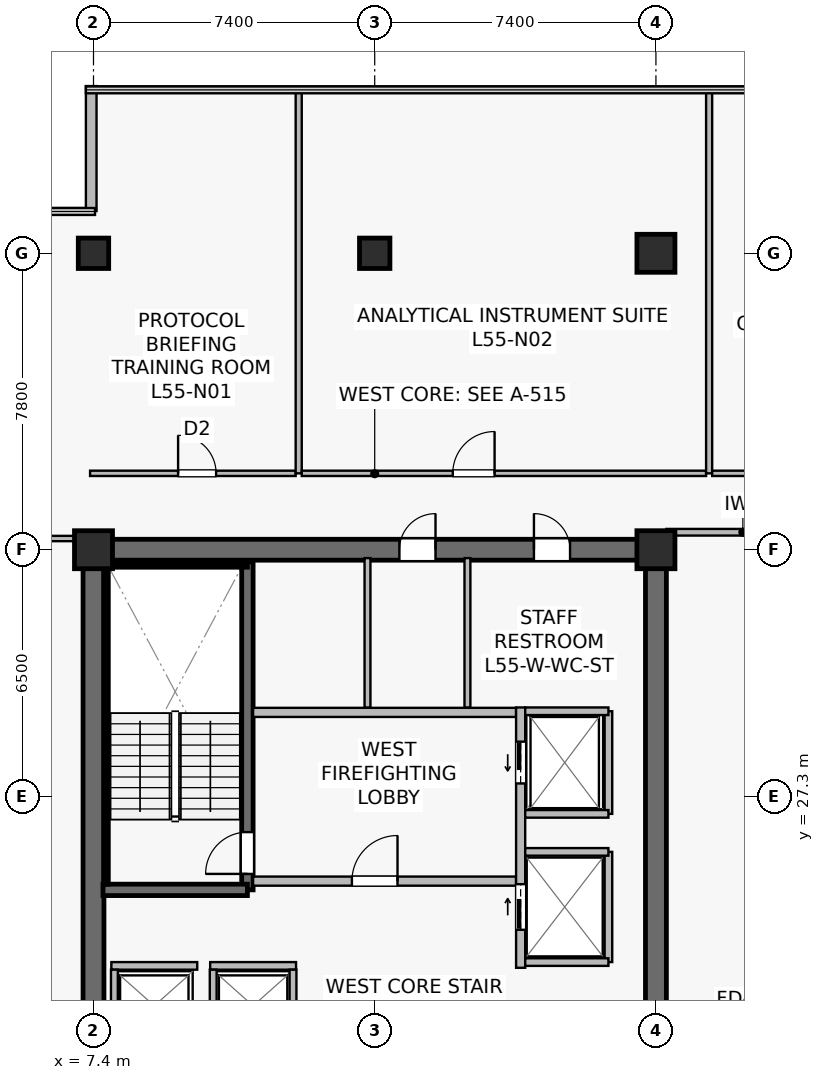
"""IFC4 building model, lengths in metres.
Left out: names, types, materials, properties, quantities, classifications, styles, units other than length and angle.
Written with IfcOpenShell. Run it as: python <this file> out.ifc"""

import sys

from ifc_helpers import new_model, si_unit, direction, frame, frame_2d, origin, origin_2d, place, context, subcontext, project, spatial, rectangle, extrude, source, transform, mapped, element, fill, save


model = new_model("IFC4")
c1 = context("Model", 3, precision=1e-05, world=origin(), true_north=direction((0.0, 1.0)))
c2 = subcontext(c1, "Body", "Model", "MODEL_VIEW")
j1 = project(units=[si_unit("LENGTHUNIT", "METRE"), si_unit("PLANEANGLEUNIT", "RADIAN")], contexts=[c1])
p1 = place(None, origin())
s1 = spatial("IfcSite", under=j1, at=p1, CompositionType="ELEMENT")
p2 = place(p1, origin())
s2 = spatial("IfcBuilding", under=s1, at=p2, CompositionType="ELEMENT")
p3 = place(p2, frame((0.0, 0.0, 230.1)))
s3 = spatial("IfcBuildingStorey", under=s2, at=p3, CompositionType="ELEMENT", Elevation=230.1)
p4 = place(p3, frame((7.125, 33.8, 0.0), z_axis=(0.0, 0.0, 1.0), x_axis=(1.0, 0.0, 0.0)))
e1 = element("IfcWall", 1, at=p4, inside=s3, PredefinedType="SHEAR", context=c2, shape_type="SweptSolid", body=[
    extrude(rectangle(XDim=15.35, YDim=0.55, at=frame_2d((7.675, 0.0))), origin(), (0.0, 0.0, 1.0), 3.8),
])
p5 = place(p4, frame((8.325, 0.0, 0.0)))
e2 = element("IfcOpeningElement", 2, at=p5, cuts=e1, PredefinedType="OPENING", context=c2, shape_type="SweptSolid", body=[
    extrude(rectangle(XDim=0.95, YDim=2.15, at=frame_2d((0.475, 1.075))), frame((0.0, 0.285, 0.0), z_axis=(0.0, -1.0, 0.0), x_axis=(1.0, 0.0, 0.0)), (0.0, 0.0, 1.0), 0.57),
])
p6 = place(p4, frame((11.865, 0.0, 0.0)))
e3 = element("IfcOpeningElement", 3, at=p6, cuts=e1, PredefinedType="OPENING", context=c2, shape_type="SweptSolid", body=[
    extrude(rectangle(XDim=0.95, YDim=2.15, at=frame_2d((0.475, 1.075))), frame((0.0, 0.285, 0.0), z_axis=(0.0, -1.0, 0.0), x_axis=(1.0, 0.0, 0.0)), (0.0, 0.0, 1.0), 0.57),
])
p7 = place(p3, frame((7.4, 15.075, 0.0), z_axis=(0.0, 0.0, 1.0), x_axis=(0.0, 1.0, 0.0)))
e4 = element("IfcWall", 4, at=p7, inside=s3, PredefinedType="SHEAR", context=c2, shape_type="SweptSolid", body=[
    extrude(rectangle(XDim=18.45, YDim=0.55, at=frame_2d((9.225, 0.0))), origin(), (0.0, 0.0, 1.0), 3.8),
])
p8 = place(p3, frame((22.2, 15.075, 0.0), z_axis=(0.0, 0.0, 1.0), x_axis=(0.0, 1.0, 0.0)))
e5 = element("IfcWall", 5, at=p8, inside=s3, PredefinedType="SHEAR", context=c2, shape_type="SweptSolid", body=[
    extrude(rectangle(XDim=18.45, YDim=0.55, at=frame_2d((9.225, 0.0))), origin(), (0.0, 0.0, 1.0), 3.8),
])
p9 = place(p8, frame((3.475, 0.0, 0.0)))
e6 = element("IfcOpeningElement", 6, at=p9, cuts=e5, PredefinedType="OPENING", context=c2, shape_type="SweptSolid", body=[
    extrude(rectangle(XDim=1.42, YDim=2.2, at=frame_2d((0.71, 1.1))), frame((0.0, 0.285, 0.0), z_axis=(0.0, -1.0, 0.0), x_axis=(1.0, 0.0, 0.0)), (0.0, 0.0, 1.0), 0.57),
])
p10 = place(p3, frame((11.45, 24.85, 0.0), z_axis=(0.0, 0.0, 1.0), x_axis=(0.0, 1.0, 0.0)))
e7 = element("IfcWall", 7, at=p10, inside=s3, PredefinedType="SHEAR", context=c2, shape_type="SweptSolid", body=[
    extrude(rectangle(XDim=8.63, YDim=0.3, at=frame_2d((4.315, 0.0))), origin(), (0.0, 0.0, 1.0), 3.8),
])
p11 = place(p10, frame((0.42, 0.0, 0.0)))
e8 = element("IfcOpeningElement", 8, at=p11, cuts=e7, PredefinedType="OPENING", context=c2, shape_type="SweptSolid", body=[
    extrude(rectangle(XDim=1.1, YDim=2.15, at=frame_2d((0.55, 1.075))), frame((0.0, 0.16, 0.0), z_axis=(0.0, -1.0, 0.0), x_axis=(1.0, 0.0, 0.0)), (0.0, 0.0, 1.0), 0.32),
])
p12 = place(p3, frame((7.65, 24.85, 0.0), z_axis=(0.0, 0.0, 1.0), x_axis=(1.0, 0.0, 0.0)))
e9 = element("IfcWall", 9, at=p12, inside=s3, PredefinedType="SHEAR", context=c2, shape_type="SweptSolid", body=[
    extrude(rectangle(XDim=3.8, YDim=0.3, at=frame_2d((1.9, 0.0))), origin(), (0.0, 0.0, 1.0), 3.8),
])
p13 = place(p3, frame((7.73, 33.4, 0.0), z_axis=(0.0, 0.0, 1.0), x_axis=(1.0, 0.0, 0.0)))
e10 = element("IfcWall", 10, at=p13, inside=s3, PredefinedType="SOLIDWALL", context=c2, shape_type="SweptSolid", body=[
    extrude(rectangle(XDim=3.72, YDim=0.12, at=frame_2d((1.86, 0.0))), origin(), (0.0, 0.0, 1.0), 3.8),
])
p14 = place(p3, frame((7.73, 25.0, 0.0), z_axis=(0.0, 0.0, 1.0), x_axis=(0.0, 1.0, 0.0)))
e11 = element("IfcWall", 11, at=p14, inside=s3, PredefinedType="SOLIDWALL", context=c2, shape_type="SweptSolid", body=[
    extrude(rectangle(XDim=8.32, YDim=0.12, at=frame_2d((4.16, 0.0))), origin(), (0.0, 0.0, 1.0), 3.8),
])
m1 = source(origin(), c2, "Body", "SweptSolid", [
    extrude(rectangle(XDim=1.0, YDim=1.0, at=origin_2d()), origin(), (0.0, 0.0, 1.0), 4.1),
])
for number, where, z_axis, x_axis in (
    (12, (7.4, 33.8, 0.0), (0.0, 0.0, 1.0), (1.0, 0.0, 0.0)),
    (13, (22.2, 33.8, 0.0), (0.0, 0.0, 1.0), (1.0, 0.0, 0.0)),
):
    element("IfcColumn", number, at=place(p3, frame(where, z_axis=z_axis, x_axis=x_axis)), inside=s3, PredefinedType="COLUMN", context=c2, shape_type="MappedRepresentation", body=[
        mapped(m1, transform((0.0, 0.0, 0.0), scale=1.0)),
    ])
m2 = source(origin(), c2, "Body", "SweptSolid", [
    extrude(rectangle(XDim=0.8, YDim=0.8, at=origin_2d()), origin(), (0.0, 0.0, 1.0), 4.1),
])
p15 = place(p3, frame((14.8, 41.6, 0.0), z_axis=(0.0, 0.0, 1.0), x_axis=(1.0, 0.0, 0.0)))
e14 = element("IfcColumn", 14, at=p15, inside=s3, PredefinedType="COLUMN", context=c2, shape_type="MappedRepresentation", body=[
    mapped(m2, transform((0.0, 0.0, 0.0), scale=1.0)),
])
p16 = place(p3, frame((22.2, 41.6, 0.0), z_axis=(0.0, 0.0, 1.0), x_axis=(1.0, 0.0, 0.0)))
e15 = element("IfcColumn", 15, at=p16, inside=s3, PredefinedType="COLUMN", context=c2, shape_type="MappedRepresentation", body=[
    mapped(m1, transform((0.0, 0.0, 0.0), scale=1.0)),
])
p17 = place(p3, frame((7.4, 41.6, 0.0), z_axis=(0.0, 0.0, 1.0), x_axis=(1.0, 0.0, 0.0)))
e16 = element("IfcColumn", 16, at=p17, inside=s3, PredefinedType="COLUMN", context=c2, shape_type="MappedRepresentation", body=[
    mapped(m2, transform((0.0, 0.0, 0.0), scale=1.0)),
])
p18 = place(p3, frame((7.34, 46.0, 0.0), z_axis=(0.0, 0.0, 1.0), x_axis=(0.0, -1.0, 0.0)))
e17 = element("IfcWall", 17, at=p18, inside=s3, PredefinedType="STANDARD", context=c2, shape_type="SweptSolid", body=[
    extrude(rectangle(XDim=3.288, YDim=0.28, at=frame_2d((1.644, 0.0))), origin(), (0.0, 0.0, 1.0), 3.8),
])
p19 = place(p3, frame((11.6, 25.08, 0.0), z_axis=(0.0, 0.0, 1.0), x_axis=(1.0, 0.0, 0.0)))
e18 = element("IfcWall", 18, at=p19, inside=s3, PredefinedType="SOLIDWALL", context=c2, shape_type="SweptSolid", body=[
    extrude(rectangle(XDim=6.92, YDim=0.24, at=frame_2d((3.46, 0.0))), origin(), (0.0, 0.0, 1.0), 3.197),
])
p20 = place(p19, frame((2.6, 0.0, 0.0)))
e19 = element("IfcOpeningElement", 19, at=p20, cuts=e18, PredefinedType="OPENING", context=c2, shape_type="SweptSolid", body=[
    extrude(rectangle(XDim=1.2, YDim=2.16, at=frame_2d((0.6, 1.08))), frame((0.0, 0.13, 0.0), z_axis=(0.0, -1.0, 0.0), x_axis=(1.0, 0.0, 0.0)), (0.0, 0.0, 1.0), 0.26),
])
p21 = place(p3, frame((11.6, 29.52, 0.0), z_axis=(0.0, 0.0, 1.0), x_axis=(1.0, 0.0, 0.0)))
e20 = element("IfcWall", 20, at=p21, inside=s3, PredefinedType="SOLIDWALL", context=c2, shape_type="SweptSolid", body=[
    extrude(rectangle(XDim=6.92, YDim=0.24, at=frame_2d((3.46, 0.0))), origin(), (0.0, 0.0, 1.0), 3.197),
])
p22 = place(p3, frame((18.64, 22.8, 0.0), z_axis=(0.0, 0.0, 1.0), x_axis=(0.0, 1.0, 0.0)))
e21 = element("IfcWall", 21, at=p22, inside=s3, PredefinedType="SOLIDWALL", context=c2, shape_type="SweptSolid", body=[
    extrude(rectangle(XDim=6.85, YDim=0.24, at=frame_2d((3.425, 0.0))), origin(), (0.0, 0.0, 1.0), 2.935),
])
p23 = place(p22, frame((4.85, 0.0, 0.0)))
e22 = element("IfcOpeningElement", 22, at=p23, cuts=e21, PredefinedType="OPENING", context=c2, shape_type="SweptSolid", body=[
    extrude(rectangle(XDim=1.1, YDim=2.22, at=frame_2d((0.55, 1.11))), frame((0.0, 0.13, 0.0), z_axis=(0.0, -1.0, 0.0), x_axis=(1.0, 0.0, 0.0)), (0.0, 0.0, 1.0), 0.26),
])
p24 = place(p22, frame((1.0, 0.0, 0.0)))
e23 = element("IfcOpeningElement", 23, at=p24, cuts=e21, PredefinedType="OPENING", context=c2, shape_type="SweptSolid", body=[
    extrude(rectangle(XDim=1.2, YDim=2.22, at=frame_2d((0.6, 1.11))), frame((0.0, 0.13, 0.0), z_axis=(0.0, -1.0, 0.0), x_axis=(1.0, 0.0, 0.0)), (0.0, 0.0, 1.0), 0.26),
])
p25 = place(p3, frame((7.87, 22.85, 0.0), z_axis=(0.0, 0.0, 1.0), x_axis=(1.0, 0.0, 0.0)))
e24 = element("IfcWall", 24, at=p25, inside=s3, PredefinedType="SOLIDWALL", context=c2, shape_type="SweptSolid", body=[
    extrude(rectangle(XDim=2.26, YDim=0.2, at=frame_2d((1.13, 0.0))), origin(), (0.0, 0.0, 1.0), 3.8),
])
p26 = place(p3, frame((7.95, 20.85, 0.0), z_axis=(0.0, 0.0, 1.0), x_axis=(0.0, 1.0, 0.0)))
e25 = element("IfcWall", 25, at=p26, inside=s3, PredefinedType="SOLIDWALL", context=c2, shape_type="SweptSolid", body=[
    extrude(rectangle(XDim=1.9, YDim=0.18, at=frame_2d((0.95, 0.0))), origin(), (0.0, 0.0, 1.0), 3.8),
])
p27 = place(p3, frame((10.47, 22.85, 0.0), z_axis=(0.0, 0.0, 1.0), x_axis=(1.0, 0.0, 0.0)))
e26 = element("IfcWall", 26, at=p27, inside=s3, PredefinedType="SOLIDWALL", context=c2, shape_type="SweptSolid", body=[
    extrude(rectangle(XDim=2.26, YDim=0.2, at=frame_2d((1.13, 0.0))), origin(), (0.0, 0.0, 1.0), 3.8),
])
for number, where, z_axis, x_axis in (
    (27, (10.55, 20.85, 0.0), (0.0, 0.0, 1.0), (0.0, 1.0, 0.0)),
    (28, (12.65, 20.85, 0.0), (0.0, 0.0, 1.0), (0.0, 1.0, 0.0)),
):
    element("IfcWall", number, at=place(p3, frame(where, z_axis=z_axis, x_axis=x_axis)), inside=s3, PredefinedType="SOLIDWALL", context=c2, shape_type="SweptSolid", body=[
        extrude(rectangle(XDim=1.9, YDim=0.18, at=frame_2d((0.95, 0.0))), origin(), (0.0, 0.0, 1.0), 3.8),
    ])
p28 = place(p3, frame((20.95, 26.85, 0.0), z_axis=(0.0, 0.0, 1.0), x_axis=(0.0, 1.0, 0.0)))
e29 = element("IfcWall", 29, at=p28, inside=s3, PredefinedType="SOLIDWALL", context=c2, shape_type="SweptSolid", body=[
    extrude(rectangle(XDim=2.7, YDim=0.2, at=frame_2d((1.35, 0.0))), origin(), (0.0, 0.0, 1.0), 3.8),
])
p29 = place(p3, frame((18.76, 29.55, 0.0), z_axis=(0.0, 0.0, 1.0), x_axis=(1.0, 0.0, 0.0)))
e30 = element("IfcWall", 30, at=p29, inside=s3, PredefinedType="SOLIDWALL", context=c2, shape_type="SweptSolid", body=[
    extrude(rectangle(XDim=2.19, YDim=0.2, at=frame_2d((1.095, 0.0))), origin(), (0.0, 0.0, 1.0), 3.8),
])
p30 = place(p3, frame((18.76, 26.85, 0.0), z_axis=(0.0, 0.0, 1.0), x_axis=(1.0, 0.0, 0.0)))
e31 = element("IfcWall", 31, at=p30, inside=s3, PredefinedType="SOLIDWALL", context=c2, shape_type="SweptSolid", body=[
    extrude(rectangle(XDim=2.19, YDim=0.2, at=frame_2d((1.095, 0.0))), origin(), (0.0, 0.0, 1.0), 3.197),
])
p31 = place(p3, frame((20.95, 22.95, 0.0), z_axis=(0.0, 0.0, 1.0), x_axis=(0.0, 1.0, 0.0)))
e32 = element("IfcWall", 32, at=p31, inside=s3, PredefinedType="SOLIDWALL", context=c2, shape_type="SweptSolid", body=[
    extrude(rectangle(XDim=2.9, YDim=0.2, at=frame_2d((1.45, 0.0))), origin(), (0.0, 0.0, 1.0), 2.935),
])
for number, where, z_axis, x_axis in (
    (33, (18.76, 25.85, 0.0), (0.0, 0.0, 1.0), (1.0, 0.0, 0.0)),
    (34, (18.76, 22.95, 0.0), (0.0, 0.0, 1.0), (1.0, 0.0, 0.0)),
):
    element("IfcWall", number, at=place(p3, frame(where, z_axis=z_axis, x_axis=x_axis)), inside=s3, PredefinedType="SOLIDWALL", context=c2, shape_type="SweptSolid", body=[
        extrude(rectangle(XDim=2.19, YDim=0.2, at=frame_2d((1.095, 0.0))), origin(), (0.0, 0.0, 1.0), 3.8),
    ])
p32 = place(p3, frame((14.61, 29.65, 0.0), z_axis=(0.0, 0.0, 1.0), x_axis=(0.0, 1.0, 0.0)))
e35 = element("IfcWall", 35, at=p32, inside=s3, PredefinedType="PLUMBINGWALL", context=c2, shape_type="SweptSolid", body=[
    extrude(rectangle(XDim=3.93, YDim=0.155, at=frame_2d((1.965, 0.0))), origin(), (0.0, 0.0, 1.0), 3.197),
])
p33 = place(p3, frame((17.24, 29.65, 0.0), z_axis=(0.0, 0.0, 1.0), x_axis=(0.0, 1.0, 0.0)))
e36 = element("IfcWall", 36, at=p33, inside=s3, PredefinedType="PLUMBINGWALL", context=c2, shape_type="SweptSolid", body=[
    extrude(rectangle(XDim=3.93, YDim=0.155, at=frame_2d((1.965, 0.0))), origin(), (0.0, 0.0, 1.0), 3.8),
])
p34 = place(p3, frame((22.475, 34.26, 0.0), z_axis=(0.0, 0.0, 1.0), x_axis=(1.0, 0.0, 0.0)))
e37 = element("IfcWall", 37, at=p34, inside=s3, PredefinedType="PARTITIONING", context=c2, shape_type="SweptSolid", body=[
    extrude(rectangle(XDim=4.025, YDim=0.175, at=frame_2d((2.012, 0.0))), origin(), (0.0, 0.0, 1.0), 3.485),
])
p35 = place(p3, frame((7.31, 35.81, 0.0), z_axis=(0.0, 0.0, 1.0), x_axis=(1.0, 0.0, 0.0)))
e38 = element("IfcWall", 38, at=p35, inside=s3, PredefinedType="PARTITIONING", context=c2, shape_type="SweptSolid", body=[
    extrude(rectangle(XDim=5.41, YDim=0.14, at=frame_2d((2.705, 0.0))), origin(), (0.0, 0.0, 1.0), 3.335),
])
p36 = place(p35, frame((2.316, 0.0, 0.0)))
e39 = element("IfcOpeningElement", 39, at=p36, cuts=e38, PredefinedType="OPENING", context=c2, shape_type="SweptSolid", body=[
    extrude(rectangle(XDim=1.0, YDim=2.15, at=frame_2d((0.5, 1.075))), frame((0.0, 0.08, 0.0), z_axis=(0.0, -1.0, 0.0), x_axis=(1.0, 0.0, 0.0)), (0.0, 0.0, 1.0), 0.16),
])
p37 = place(p3, frame((12.8, 35.81, 0.0), z_axis=(0.0, 0.0, 1.0), x_axis=(0.0, 1.0, 0.0)))
e40 = element("IfcWall", 40, at=p37, inside=s3, PredefinedType="PARTITIONING", context=c2, shape_type="SweptSolid", body=[
    extrude(rectangle(XDim=10.08, YDim=0.16, at=frame_2d((5.04, 0.0))), origin(), (0.0, 0.0, 1.0), 3.135),
])
p38 = place(p3, frame((12.88, 35.81, 0.0), z_axis=(0.0, 0.0, 1.0), x_axis=(1.0, 0.0, 0.0)))
e41 = element("IfcWall", 41, at=p38, inside=s3, PredefinedType="PARTITIONING", context=c2, shape_type="SweptSolid", body=[
    extrude(rectangle(XDim=10.64, YDim=0.14, at=frame_2d((5.32, 0.0))), origin(), (0.0, 0.0, 1.0), 3.197),
])
p39 = place(p38, frame((3.974, 0.0, 0.0)))
e42 = element("IfcOpeningElement", 42, at=p39, cuts=e41, PredefinedType="OPENING", context=c2, shape_type="SweptSolid", body=[
    extrude(rectangle(XDim=1.1, YDim=2.18, at=frame_2d((0.55, 1.09))), frame((0.0, 0.08, 0.0), z_axis=(0.0, -1.0, 0.0), x_axis=(1.0, 0.0, 0.0)), (0.0, 0.0, 1.0), 0.16),
])
p40 = place(p3, frame((23.6, 35.81, 0.0), z_axis=(0.0, 0.0, 1.0), x_axis=(0.0, 1.0, 0.0)))
e43 = element("IfcWall", 43, at=p40, inside=s3, PredefinedType="PARTITIONING", context=c2, shape_type="SweptSolid", body=[
    extrude(rectangle(XDim=10.08, YDim=0.16, at=frame_2d((5.04, 0.0))), origin(), (0.0, 0.0, 1.0), 3.135),
])
p41 = place(p3, frame((23.68, 35.81, 0.0), z_axis=(0.0, 0.0, 1.0), x_axis=(1.0, 0.0, 0.0)))
e44 = element("IfcWall", 44, at=p41, inside=s3, PredefinedType="PARTITIONING", context=c2, shape_type="SweptSolid", body=[
    extrude(rectangle(XDim=12.04, YDim=0.14, at=frame_2d((6.02, 0.0))), origin(), (0.0, 0.0, 1.0), 3.197),
])
p42 = place(p41, frame((5.777, 0.0, 0.0)))
e45 = element("IfcOpeningElement", 45, at=p42, cuts=e44, PredefinedType="OPENING", context=c2, shape_type="SweptSolid", body=[
    extrude(rectangle(XDim=1.1, YDim=2.18, at=frame_2d((0.55, 1.09))), frame((0.0, 0.08, 0.0), z_axis=(0.0, -1.0, 0.0), x_axis=(1.0, 0.0, 0.0)), (0.0, 0.0, 1.0), 0.16),
])
p43 = place(p3, frame((4.11, 34.095, 0.0), z_axis=(0.0, 0.0, 1.0), x_axis=(1.0, 0.0, 0.0)))
e46 = element("IfcWall", 46, at=p43, inside=s3, PredefinedType="PARTITIONING", context=c2, shape_type="SweptSolid", body=[
    extrude(rectangle(XDim=2.91, YDim=0.14, at=frame_2d((1.455, 0.0))), origin(), (0.0, 0.0, 1.0), 3.8),
])
p44 = place(p43, frame((1.005, 0.0, 0.0)))
e47 = element("IfcOpeningElement", 47, at=p44, cuts=e46, PredefinedType="OPENING", context=c2, shape_type="SweptSolid", body=[
    extrude(rectangle(XDim=0.9, YDim=2.1, at=frame_2d((0.45, 1.05))), frame((0.0, 0.08, 0.0), z_axis=(0.0, -1.0, 0.0), x_axis=(1.0, 0.0, 0.0)), (0.0, 0.0, 1.0), 0.16),
])
m3 = source(origin(), c2, "Body", "SweptSolid", [
    extrude(rectangle(XDim=1.1, YDim=2.15, at=frame_2d((0.55, 1.075))), frame((0.0, 0.025, 0.0), z_axis=(0.0, -1.0, 0.0), x_axis=(1.0, 0.0, 0.0)), (0.0, 0.0, 1.0), 0.05),
])
p45 = place(p11, origin())
e48 = element("IfcDoor", 48, at=p45, inside=s3, OperationType="SINGLE_SWING_LEFT", PredefinedType="DOOR", context=c2, shape_type="MappedRepresentation", body=[
    mapped(m3, transform((0.0, 0.0, 0.0), scale=1.0)),
])
fill(e8, e48)
m4 = source(origin(), c2, "Body", "SweptSolid", [
    extrude(rectangle(XDim=1.2, YDim=2.16, at=frame_2d((0.6, 1.08))), frame((0.0, 0.025, 0.0), z_axis=(0.0, -1.0, 0.0), x_axis=(1.0, 0.0, 0.0)), (0.0, 0.0, 1.0), 0.05),
])
p46 = place(p20, origin())
e49 = element("IfcDoor", 49, at=p46, inside=s3, OperationType="SINGLE_SWING_RIGHT", PredefinedType="DOOR", context=c2, shape_type="MappedRepresentation", body=[
    mapped(m4, transform((0.0, 0.0, 0.0), scale=1.0)),
])
fill(e19, e49)
m5 = source(origin(), c2, "Body", "SweptSolid", [
    extrude(rectangle(XDim=1.1, YDim=2.22, at=frame_2d((0.55, 1.11))), frame((0.0, 0.025, 0.0), z_axis=(0.0, -1.0, 0.0), x_axis=(1.0, 0.0, 0.0)), (0.0, 0.0, 1.0), 0.05),
])
p47 = place(p23, origin())
e50 = element("IfcDoor", 50, at=p47, inside=s3, OperationType="SLIDING_TO_LEFT", PredefinedType="USERDEFINED", context=c2, shape_type="MappedRepresentation", body=[
    mapped(m5, transform((0.0, 0.0, 0.0), scale=1.0)),
])
fill(e22, e50)
m6 = source(origin(), c2, "Body", "SweptSolid", [
    extrude(rectangle(XDim=1.2, YDim=2.22, at=frame_2d((0.6, 1.11))), frame((0.0, 0.025, 0.0), z_axis=(0.0, -1.0, 0.0), x_axis=(1.0, 0.0, 0.0)), (0.0, 0.0, 1.0), 0.05),
])
p48 = place(p24, origin())
e51 = element("IfcDoor", 51, at=p48, inside=s3, OperationType="SLIDING_TO_RIGHT", PredefinedType="USERDEFINED", context=c2, shape_type="MappedRepresentation", body=[
    mapped(m6, transform((0.0, 0.0, 0.0), scale=1.0)),
])
fill(e23, e51)
m7 = source(origin(), c2, "Body", "SweptSolid", [
    extrude(rectangle(XDim=0.95, YDim=2.15, at=frame_2d((0.475, 1.075))), frame((0.0, 0.025, 0.0), z_axis=(0.0, -1.0, 0.0), x_axis=(1.0, 0.0, 0.0)), (0.0, 0.0, 1.0), 0.05),
])
p49 = place(p5, origin())
e52 = element("IfcDoor", 52, at=p49, inside=s3, OperationType="SINGLE_SWING_RIGHT", PredefinedType="DOOR", context=c2, shape_type="MappedRepresentation", body=[
    mapped(m7, transform((0.0, 0.0, 0.0), scale=1.0)),
])
fill(e2, e52)
p50 = place(p6, origin())
e53 = element("IfcDoor", 53, at=p50, inside=s3, OperationType="SINGLE_SWING_LEFT", PredefinedType="DOOR", context=c2, shape_type="MappedRepresentation", body=[
    mapped(m7, transform((0.0, 0.0, 0.0), scale=1.0)),
])
fill(e3, e53)
m8 = source(origin(), c2, "Body", "SweptSolid", [
    extrude(rectangle(XDim=1.0, YDim=2.15, at=frame_2d((0.5, 1.075))), frame((0.0, 0.025, 0.0), z_axis=(0.0, -1.0, 0.0), x_axis=(1.0, 0.0, 0.0)), (0.0, 0.0, 1.0), 0.05),
])
p51 = place(p36, origin())
e54 = element("IfcDoor", 54, at=p51, inside=s3, OperationType="SINGLE_SWING_LEFT", PredefinedType="DOOR", context=c2, shape_type="MappedRepresentation", body=[
    mapped(m8, transform((0.0, 0.0, 0.0), scale=1.0)),
])
fill(e39, e54)
m9 = source(origin(), c2, "Body", "SweptSolid", [
    extrude(rectangle(XDim=1.1, YDim=2.18, at=frame_2d((0.55, 1.09))), frame((0.0, 0.025, 0.0), z_axis=(0.0, -1.0, 0.0), x_axis=(1.0, 0.0, 0.0)), (0.0, 0.0, 1.0), 0.05),
])
p52 = place(p39, origin())
e55 = element("IfcDoor", 55, at=p52, inside=s3, OperationType="SINGLE_SWING_RIGHT", PredefinedType="DOOR", context=c2, shape_type="MappedRepresentation", body=[
    mapped(m9, transform((0.0, 0.0, 0.0), scale=1.0)),
])
fill(e42, e55)
save(model, sys.argv[1])
